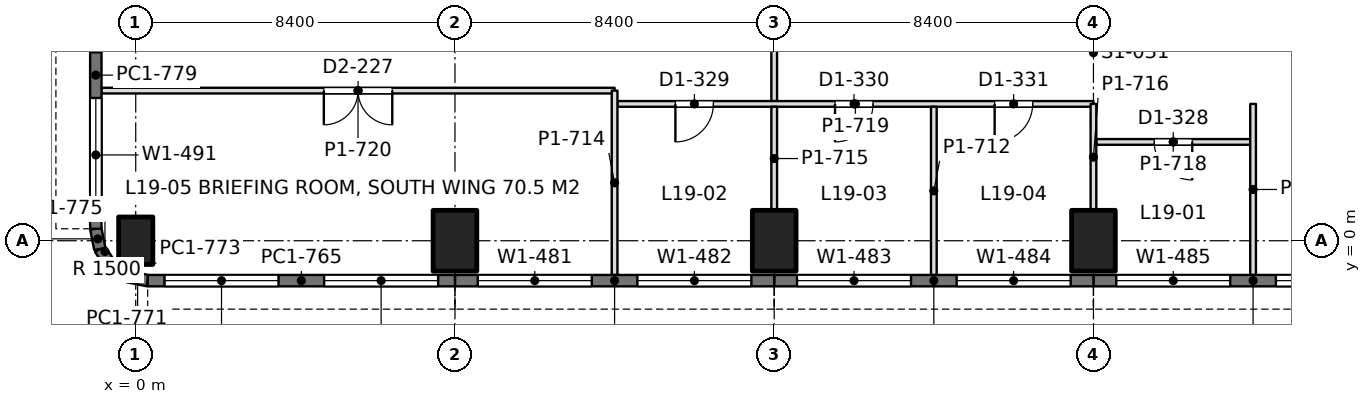
"""IFC4 building model, lengths in metres.
Left out: names, types, materials, properties, quantities, classifications, styles, units other than length and angle.
Written with IfcOpenShell. Run it as: python <this file> out.ifc"""

import sys

from ifc_helpers import new_model, si_unit, direction, frame, frame_2d, origin, origin_with_axes, origin_2d, place, context, subcontext, project, spatial, rectangle, extrude, element, fill, save


model = new_model("IFC4")
c1 = context("Model", 3, precision=1e-05, world=origin(), true_north=direction((0.0, 1.0)))
c2 = subcontext(c1, "Body", "Model", "MODEL_VIEW")
j1 = project(units=[si_unit("LENGTHUNIT", "METRE"), si_unit("PLANEANGLEUNIT", "RADIAN")], contexts=[c1])
p1 = place(None, origin())
s1 = spatial("IfcSite", under=j1, at=p1, CompositionType="ELEMENT")
p2 = place(p1, origin())
s2 = spatial("IfcBuilding", under=s1, at=p2, CompositionType="ELEMENT")
p3 = place(p2, frame((0.0, 0.0, 86.4)))
s3 = spatial("IfcBuildingStorey", under=s2, at=p3, CompositionType="ELEMENT", Elevation=86.4)
p4 = place(p3, origin_with_axes())
e1 = element("IfcColumn", 1, at=p4, inside=s3, PredefinedType="COLUMN", context=c2, shape_type="SweptSolid", body=[
    extrude(rectangle(XDim=0.9, YDim=1.25, at=origin_2d()), origin(), (0.0, 0.0, 1.0), 4.5),
])
for number, where, z_axis, x_axis in (
    (2, (8.4, 0.0, 0.0), (0.0, 0.0, 1.0), (1.0, 0.0, 0.0)),
    (3, (16.8, 0.0, 0.0), (0.0, 0.0, 1.0), (1.0, 0.0, 0.0)),
    (4, (25.2, 0.0, 0.0), (0.0, 0.0, 1.0), (1.0, 0.0, 0.0)),
):
    element("IfcColumn", number, at=place(p3, frame(where, z_axis=z_axis, x_axis=x_axis)), inside=s3, PredefinedType="COLUMN", context=c2, shape_type="SweptSolid", body=[
        extrude(rectangle(XDim=1.15, YDim=1.6, at=origin_2d()), origin(), (0.0, 0.0, 1.0), 4.5),
    ])
p5 = place(p3, frame((33.6, -1.05, 0.0), z_axis=(0.0, 0.0, 1.0), x_axis=(-1.0, 0.0, 0.0)))
e5 = element("IfcWall", 5, at=p5, inside=s3, PredefinedType="SOLIDWALL", context=c2, shape_type="SweptSolid", body=[
    extrude(rectangle(XDim=8.4, YDim=0.3, at=frame_2d((4.2, 0.0))), origin(), (0.0, 0.0, 1.0), 4.3),
])
p6 = place(p5, frame((0.6, 0.0, 0.9)))
e6 = element("IfcOpeningElement", 6, at=p6, cuts=e5, PredefinedType="OPENING", context=c2, shape_type="SweptSolid", body=[
    extrude(rectangle(XDim=3.0, YDim=1.9, at=frame_2d((1.5, 0.95))), frame((0.0, 0.16, 0.0), z_axis=(0.0, -1.0, 0.0), x_axis=(1.0, 0.0, 0.0)), (0.0, 0.0, 1.0), 0.32),
])
p7 = place(p5, frame((4.8, 0.0, 0.9)))
e7 = element("IfcOpeningElement", 7, at=p7, cuts=e5, PredefinedType="OPENING", context=c2, shape_type="SweptSolid", body=[
    extrude(rectangle(XDim=3.0, YDim=1.9, at=frame_2d((1.5, 0.95))), frame((0.0, 0.16, 0.0), z_axis=(0.0, -1.0, 0.0), x_axis=(1.0, 0.0, 0.0)), (0.0, 0.0, 1.0), 0.32),
])
p8 = place(p3, frame((25.2, -1.05, 0.0), z_axis=(0.0, 0.0, 1.0), x_axis=(-1.0, 0.0, 0.0)))
e8 = element("IfcWall", 8, at=p8, inside=s3, PredefinedType="SOLIDWALL", context=c2, shape_type="SweptSolid", body=[
    extrude(rectangle(XDim=8.4, YDim=0.3, at=frame_2d((4.2, 0.0))), origin(), (0.0, 0.0, 1.0), 4.3),
])
p9 = place(p8, frame((0.6, 0.0, 0.9)))
e9 = element("IfcOpeningElement", 9, at=p9, cuts=e8, PredefinedType="OPENING", context=c2, shape_type="SweptSolid", body=[
    extrude(rectangle(XDim=3.0, YDim=1.9, at=frame_2d((1.5, 0.95))), frame((0.0, 0.16, 0.0), z_axis=(0.0, -1.0, 0.0), x_axis=(1.0, 0.0, 0.0)), (0.0, 0.0, 1.0), 0.32),
])
p10 = place(p8, frame((4.8, 0.0, 0.9)))
e10 = element("IfcOpeningElement", 10, at=p10, cuts=e8, PredefinedType="OPENING", context=c2, shape_type="SweptSolid", body=[
    extrude(rectangle(XDim=3.0, YDim=1.9, at=frame_2d((1.5, 0.95))), frame((0.0, 0.16, 0.0), z_axis=(0.0, -1.0, 0.0), x_axis=(1.0, 0.0, 0.0)), (0.0, 0.0, 1.0), 0.32),
])
p11 = place(p3, frame((16.8, -1.05, 0.0), z_axis=(0.0, 0.0, 1.0), x_axis=(-1.0, 0.0, 0.0)))
e11 = element("IfcWall", 11, at=p11, inside=s3, PredefinedType="SOLIDWALL", context=c2, shape_type="SweptSolid", body=[
    extrude(rectangle(XDim=8.4, YDim=0.3, at=frame_2d((4.2, 0.0))), origin(), (0.0, 0.0, 1.0), 4.3),
])
p12 = place(p11, frame((0.6, 0.0, 0.9)))
e12 = element("IfcOpeningElement", 12, at=p12, cuts=e11, PredefinedType="OPENING", context=c2, shape_type="SweptSolid", body=[
    extrude(rectangle(XDim=3.0, YDim=1.9, at=frame_2d((1.5, 0.95))), frame((0.0, 0.16, 0.0), z_axis=(0.0, -1.0, 0.0), x_axis=(1.0, 0.0, 0.0)), (0.0, 0.0, 1.0), 0.32),
])
p13 = place(p11, frame((4.8, 0.0, 0.9)))
e13 = element("IfcOpeningElement", 13, at=p13, cuts=e11, PredefinedType="OPENING", context=c2, shape_type="SweptSolid", body=[
    extrude(rectangle(XDim=3.0, YDim=1.9, at=frame_2d((1.5, 0.95))), frame((0.0, 0.16, 0.0), z_axis=(0.0, -1.0, 0.0), x_axis=(1.0, 0.0, 0.0)), (0.0, 0.0, 1.0), 0.32),
])
p14 = place(p3, frame((8.4, -1.05, 0.0), z_axis=(0.0, 0.0, 1.0), x_axis=(-1.0, 0.0, 0.0)))
e14 = element("IfcWall", 14, at=p14, inside=s3, PredefinedType="SOLIDWALL", context=c2, shape_type="SweptSolid", body=[
    extrude(rectangle(XDim=8.085, YDim=0.3, at=frame_2d((4.042, 0.0))), origin(), (0.0, 0.0, 1.0), 4.3),
])
p15 = place(p14, frame((0.443, 0.0, 0.9)))
e15 = element("IfcOpeningElement", 15, at=p15, cuts=e14, PredefinedType="OPENING", context=c2, shape_type="SweptSolid", body=[
    extrude(rectangle(XDim=3.0, YDim=1.9, at=frame_2d((1.5, 0.95))), frame((0.0, 0.16, 0.0), z_axis=(0.0, -1.0, 0.0), x_axis=(1.0, 0.0, 0.0)), (0.0, 0.0, 1.0), 0.32),
])
p16 = place(p14, frame((4.643, 0.0, 0.9)))
e16 = element("IfcOpeningElement", 16, at=p16, cuts=e14, PredefinedType="OPENING", context=c2, shape_type="SweptSolid", body=[
    extrude(rectangle(XDim=3.0, YDim=1.9, at=frame_2d((1.5, 0.95))), frame((0.0, 0.16, 0.0), z_axis=(0.0, -1.0, 0.0), x_axis=(1.0, 0.0, 0.0)), (0.0, 0.0, 1.0), 0.32),
])
p17 = place(p3, frame((0.315, -1.05, 0.0), z_axis=(0.0, 0.0, 1.0), x_axis=(-0.980788534345, 0.195073962632, 0.0)))
e17 = element("IfcWall", 17, at=p17, inside=s3, PredefinedType="SOLIDWALL", context=c2, shape_type="SweptSolid", body=[
    extrude(rectangle(XDim=0.541, YDim=0.3, at=frame_2d((0.271, 0.0))), origin(), (0.0, 0.0, 1.0), 4.3),
])
for number, where, z_axis, x_axis in (
    (18, (-0.216, -0.945, 0.0), (0.0, 0.0, 1.0), (-0.831, 0.556, 0.0)),
    (19, (-0.653, -0.653, 0.0), (0.0, 0.0, 1.0), (-0.556, 0.831, 0.0)),
):
    element("IfcWall", number, at=place(p3, frame(where, z_axis=z_axis, x_axis=x_axis)), inside=s3, PredefinedType="SOLIDWALL", context=c2, shape_type="SweptSolid", body=[
        extrude(rectangle(XDim=0.526, YDim=0.3, at=frame_2d((0.263, 0.0))), origin(), (0.0, 0.0, 1.0), 4.3),
    ])
p18 = place(p3, frame((-0.945, -0.216, 0.0), z_axis=(0.0, 0.0, 1.0), x_axis=(-0.195073962632, 0.980788534345, 0.0)))
e20 = element("IfcWall", 20, at=p18, inside=s3, PredefinedType="SOLIDWALL", context=c2, shape_type="SweptSolid", body=[
    extrude(rectangle(XDim=0.541, YDim=0.3, at=frame_2d((0.271, 0.0))), origin(), (0.0, 0.0, 1.0), 4.3),
])
p19 = place(p3, frame((-1.05, 0.315, 0.0), z_axis=(0.0, 0.0, 1.0), x_axis=(0.0, 1.0, 0.0)))
e21 = element("IfcWall", 21, at=p19, inside=s3, PredefinedType="SOLIDWALL", context=c2, shape_type="SweptSolid", body=[
    extrude(rectangle(XDim=8.085, YDim=0.3, at=frame_2d((4.042, 0.0))), origin(), (0.0, 0.0, 1.0), 4.3),
])
p20 = place(p19, frame((0.443, 0.0, 0.9)))
e22 = element("IfcOpeningElement", 22, at=p20, cuts=e21, PredefinedType="OPENING", context=c2, shape_type="SweptSolid", body=[
    extrude(rectangle(XDim=3.0, YDim=1.9, at=frame_2d((1.5, 0.95))), frame((0.0, 0.16, 0.0), z_axis=(0.0, -1.0, 0.0), x_axis=(1.0, 0.0, 0.0)), (0.0, 0.0, 1.0), 0.32),
])
p21 = place(p19, frame((4.643, 0.0, 0.9)))
e23 = element("IfcOpeningElement", 23, at=p21, cuts=e21, PredefinedType="OPENING", context=c2, shape_type="SweptSolid", body=[
    extrude(rectangle(XDim=3.0, YDim=1.9, at=frame_2d((1.5, 0.95))), frame((0.0, 0.16, 0.0), z_axis=(0.0, -1.0, 0.0), x_axis=(1.0, 0.0, 0.0)), (0.0, 0.0, 1.0), 0.32),
])
p22 = place(p3, frame((-0.902, 3.95, 0.0), z_axis=(0.0, 0.0, 1.0), x_axis=(1.0, 0.0, 0.0)))
e24 = element("IfcWall", 24, at=p22, inside=s3, PredefinedType="PARTITIONING", context=c2, shape_type="SweptSolid", body=[
    extrude(rectangle(XDim=13.502, YDim=0.15, at=frame_2d((6.751, 0.0))), origin(), (0.0, 0.0, 1.0), 3.6),
])
p23 = place(p22, frame((5.852, 0.0, 0.0)))
e25 = element("IfcOpeningElement", 25, at=p23, cuts=e24, PredefinedType="OPENING", context=c2, shape_type="SweptSolid", body=[
    extrude(rectangle(XDim=1.8, YDim=2.2, at=frame_2d((0.9, 1.1))), frame((0.0, 0.085, 0.0), z_axis=(0.0, -1.0, 0.0), x_axis=(1.0, 0.0, 0.0)), (0.0, 0.0, 1.0), 0.17),
])
p24 = place(p3, frame((25.274, 2.6, 0.0), z_axis=(0.0, 0.0, 1.0), x_axis=(1.0, 0.0, 0.0)))
e26 = element("IfcWall", 26, at=p24, inside=s3, PredefinedType="PARTITIONING", context=c2, shape_type="SweptSolid", body=[
    extrude(rectangle(XDim=4.052, YDim=0.15, at=frame_2d((2.026, 0.0))), origin(), (0.0, 0.0, 1.0), 3.6),
])
p25 = place(p24, frame((1.526, 0.0, 0.0)))
e27 = element("IfcOpeningElement", 27, at=p25, cuts=e26, PredefinedType="OPENING", context=c2, shape_type="SweptSolid", body=[
    extrude(rectangle(XDim=1.0, YDim=2.2, at=frame_2d((0.5, 1.1))), frame((0.0, 0.085, 0.0), z_axis=(0.0, -1.0, 0.0), x_axis=(1.0, 0.0, 0.0)), (0.0, 0.0, 1.0), 0.17),
])
p26 = place(p3, frame((12.674, 3.6, 0.0), z_axis=(0.0, 0.0, 1.0), x_axis=(1.0, 0.0, 0.0)))
e28 = element("IfcWall", 28, at=p26, inside=s3, PredefinedType="PARTITIONING", context=c2, shape_type="SweptSolid", body=[
    extrude(rectangle(XDim=12.526, YDim=0.15, at=frame_2d((6.263, 0.0))), origin(), (0.0, 0.0, 1.0), 3.6),
])
p27 = place(p26, frame((1.526, 0.0, 0.0)))
e29 = element("IfcOpeningElement", 29, at=p27, cuts=e28, PredefinedType="OPENING", context=c2, shape_type="SweptSolid", body=[
    extrude(rectangle(XDim=1.0, YDim=2.2, at=frame_2d((0.5, 1.1))), frame((0.0, 0.085, 0.0), z_axis=(0.0, -1.0, 0.0), x_axis=(1.0, 0.0, 0.0)), (0.0, 0.0, 1.0), 0.17),
])
p28 = place(p26, frame((5.726, 0.0, 0.0)))
e30 = element("IfcOpeningElement", 30, at=p28, cuts=e28, PredefinedType="OPENING", context=c2, shape_type="SweptSolid", body=[
    extrude(rectangle(XDim=1.0, YDim=2.2, at=frame_2d((0.5, 1.1))), frame((0.0, 0.085, 0.0), z_axis=(0.0, -1.0, 0.0), x_axis=(1.0, 0.0, 0.0)), (0.0, 0.0, 1.0), 0.17),
])
p29 = place(p26, frame((9.926, 0.0, 0.0)))
e31 = element("IfcOpeningElement", 31, at=p29, cuts=e28, PredefinedType="OPENING", context=c2, shape_type="SweptSolid", body=[
    extrude(rectangle(XDim=1.0, YDim=2.2, at=frame_2d((0.5, 1.1))), frame((0.0, 0.085, 0.0), z_axis=(0.0, -1.0, 0.0), x_axis=(1.0, 0.0, 0.0)), (0.0, 0.0, 1.0), 0.17),
])
p30 = place(p3, frame((12.6, -0.902, 0.0), z_axis=(0.0, 0.0, 1.0), x_axis=(0.0, 1.0, 0.0)))
e32 = element("IfcWall", 32, at=p30, inside=s3, PredefinedType="PARTITIONING", context=c2, shape_type="SweptSolid", body=[
    extrude(rectangle(XDim=4.852, YDim=0.15, at=frame_2d((2.426, 0.0))), origin(), (0.0, 0.0, 1.0), 3.854),
])
p31 = place(p3, frame((16.8, 0.799, 0.0), z_axis=(0.0, 0.0, 1.0), x_axis=(0.0, 1.0, 0.0)))
e33 = element("IfcWall", 33, at=p31, inside=s3, PredefinedType="PARTITIONING", context=c2, shape_type="SweptSolid", body=[
    extrude(rectangle(XDim=2.727, YDim=0.15, at=frame_2d((1.363, 0.0))), origin(), (0.0, 0.0, 1.0), 3.6),
])
p32 = place(p3, frame((21.0, -0.902, 0.0), z_axis=(0.0, 0.0, 1.0), x_axis=(0.0, 1.0, 0.0)))
e34 = element("IfcWall", 34, at=p32, inside=s3, PredefinedType="PARTITIONING", context=c2, shape_type="SweptSolid", body=[
    extrude(rectangle(XDim=4.428, YDim=0.15, at=frame_2d((2.214, 0.0))), origin(), (0.0, 0.0, 1.0), 3.854),
])
p33 = place(p3, frame((25.2, 0.799, 0.0), z_axis=(0.0, 0.0, 1.0), x_axis=(0.0, 1.0, 0.0)))
e35 = element("IfcWall", 35, at=p33, inside=s3, PredefinedType="PARTITIONING", context=c2, shape_type="SweptSolid", body=[
    extrude(rectangle(XDim=2.801, YDim=0.15, at=frame_2d((1.4, 0.0))), origin(), (0.0, 0.0, 1.0), 3.6),
])
p34 = place(p3, frame((29.4, -0.902, 0.0), z_axis=(0.0, 0.0, 1.0), x_axis=(0.0, 1.0, 0.0)))
e36 = element("IfcWall", 36, at=p34, inside=s3, PredefinedType="PARTITIONING", context=c2, shape_type="SweptSolid", body=[
    extrude(rectangle(XDim=4.502, YDim=0.15, at=frame_2d((2.251, 0.0))), origin(), (0.0, 0.0, 1.0), 3.854),
])
p35 = place(p3, frame((16.8, 3.674, 0.0), z_axis=(0.0, 0.0, 1.0), x_axis=(0.0, 1.0, 0.0)))
e37 = element("IfcWall", 37, at=p35, inside=s3, PredefinedType="PARTITIONING", context=c2, shape_type="SweptSolid", body=[
    extrude(rectangle(XDim=3.827, YDim=0.15, at=frame_2d((1.914, 0.0))), origin(), (0.0, 0.0, 1.0), 3.6),
])
p36 = place(p6, origin())
e38 = element("IfcWindow", 38, at=p36, inside=s3, PartitioningType="SINGLE_PANEL", PredefinedType="WINDOW", context=c2, shape_type="SweptSolid", body=[
    extrude(rectangle(XDim=3.0, YDim=1.9, at=frame_2d((1.5, 0.95))), frame((0.0, 0.03, 0.0), z_axis=(0.0, -1.0, 0.0), x_axis=(1.0, 0.0, 0.0)), (0.0, 0.0, 1.0), 0.06),
])
fill(e6, e38)
p37 = place(p7, origin())
e39 = element("IfcWindow", 39, at=p37, inside=s3, PartitioningType="SINGLE_PANEL", PredefinedType="WINDOW", context=c2, shape_type="SweptSolid", body=[
    extrude(rectangle(XDim=3.0, YDim=1.9, at=frame_2d((1.5, 0.95))), frame((0.0, 0.03, 0.0), z_axis=(0.0, -1.0, 0.0), x_axis=(1.0, 0.0, 0.0)), (0.0, 0.0, 1.0), 0.06),
])
fill(e7, e39)
p38 = place(p9, origin())
e40 = element("IfcWindow", 40, at=p38, inside=s3, PartitioningType="SINGLE_PANEL", PredefinedType="WINDOW", context=c2, shape_type="SweptSolid", body=[
    extrude(rectangle(XDim=3.0, YDim=1.9, at=frame_2d((1.5, 0.95))), frame((0.0, 0.03, 0.0), z_axis=(0.0, -1.0, 0.0), x_axis=(1.0, 0.0, 0.0)), (0.0, 0.0, 1.0), 0.06),
])
fill(e9, e40)
p39 = place(p10, origin())
e41 = element("IfcWindow", 41, at=p39, inside=s3, PartitioningType="SINGLE_PANEL", PredefinedType="WINDOW", context=c2, shape_type="SweptSolid", body=[
    extrude(rectangle(XDim=3.0, YDim=1.9, at=frame_2d((1.5, 0.95))), frame((0.0, 0.03, 0.0), z_axis=(0.0, -1.0, 0.0), x_axis=(1.0, 0.0, 0.0)), (0.0, 0.0, 1.0), 0.06),
])
fill(e10, e41)
p40 = place(p12, origin())
e42 = element("IfcWindow", 42, at=p40, inside=s3, PartitioningType="SINGLE_PANEL", PredefinedType="WINDOW", context=c2, shape_type="SweptSolid", body=[
    extrude(rectangle(XDim=3.0, YDim=1.9, at=frame_2d((1.5, 0.95))), frame((0.0, 0.03, 0.0), z_axis=(0.0, -1.0, 0.0), x_axis=(1.0, 0.0, 0.0)), (0.0, 0.0, 1.0), 0.06),
])
fill(e12, e42)
p41 = place(p13, origin())
e43 = element("IfcWindow", 43, at=p41, inside=s3, PartitioningType="SINGLE_PANEL", PredefinedType="WINDOW", context=c2, shape_type="SweptSolid", body=[
    extrude(rectangle(XDim=3.0, YDim=1.9, at=frame_2d((1.5, 0.95))), frame((0.0, 0.03, 0.0), z_axis=(0.0, -1.0, 0.0), x_axis=(1.0, 0.0, 0.0)), (0.0, 0.0, 1.0), 0.06),
])
fill(e13, e43)
p42 = place(p15, origin())
e44 = element("IfcWindow", 44, at=p42, inside=s3, PartitioningType="SINGLE_PANEL", PredefinedType="WINDOW", context=c2, shape_type="SweptSolid", body=[
    extrude(rectangle(XDim=3.0, YDim=1.9, at=frame_2d((1.5, 0.95))), frame((0.0, 0.03, 0.0), z_axis=(0.0, -1.0, 0.0), x_axis=(1.0, 0.0, 0.0)), (0.0, 0.0, 1.0), 0.06),
])
fill(e15, e44)
p43 = place(p16, origin())
e45 = element("IfcWindow", 45, at=p43, inside=s3, PartitioningType="SINGLE_PANEL", PredefinedType="WINDOW", context=c2, shape_type="SweptSolid", body=[
    extrude(rectangle(XDim=3.0, YDim=1.9, at=frame_2d((1.5, 0.95))), frame((0.0, 0.03, 0.0), z_axis=(0.0, -1.0, 0.0), x_axis=(1.0, 0.0, 0.0)), (0.0, 0.0, 1.0), 0.06),
])
fill(e16, e45)
p44 = place(p20, origin())
e46 = element("IfcWindow", 46, at=p44, inside=s3, PartitioningType="SINGLE_PANEL", PredefinedType="WINDOW", context=c2, shape_type="SweptSolid", body=[
    extrude(rectangle(XDim=3.0, YDim=1.9, at=frame_2d((1.5, 0.95))), frame((0.0, 0.03, 0.0), z_axis=(0.0, -1.0, 0.0), x_axis=(1.0, 0.0, 0.0)), (0.0, 0.0, 1.0), 0.06),
])
fill(e22, e46)
p45 = place(p23, frame((1.8, 0.0, 0.0), z_axis=(0.0, 0.0, 1.0), x_axis=(-1.0, 0.0, 0.0)))
e47 = element("IfcDoor", 47, at=p45, inside=s3, OperationType="DOUBLE_DOOR_SINGLE_SWING", PredefinedType="DOOR", context=c2, shape_type="SweptSolid", body=[
    extrude(rectangle(XDim=1.8, YDim=2.2, at=frame_2d((0.9, 1.1))), frame((0.0, 0.025, 0.0), z_axis=(0.0, -1.0, 0.0), x_axis=(1.0, 0.0, 0.0)), (0.0, 0.0, 1.0), 0.05),
])
fill(e25, e47)
p46 = place(p25, frame((1.0, 0.0, 0.0), z_axis=(0.0, 0.0, 1.0), x_axis=(-1.0, 0.0, 0.0)))
e48 = element("IfcDoor", 48, at=p46, inside=s3, OperationType="SINGLE_SWING_LEFT", PredefinedType="DOOR", context=c2, shape_type="SweptSolid", body=[
    extrude(rectangle(XDim=1.0, YDim=2.2, at=frame_2d((0.5, 1.1))), frame((0.0, 0.025, 0.0), z_axis=(0.0, -1.0, 0.0), x_axis=(1.0, 0.0, 0.0)), (0.0, 0.0, 1.0), 0.05),
])
fill(e27, e48)
p47 = place(p27, frame((1.0, 0.0, 0.0), z_axis=(0.0, 0.0, 1.0), x_axis=(-1.0, 0.0, 0.0)))
e49 = element("IfcDoor", 49, at=p47, inside=s3, OperationType="SINGLE_SWING_RIGHT", PredefinedType="DOOR", context=c2, shape_type="SweptSolid", body=[
    extrude(rectangle(XDim=1.0, YDim=2.2, at=frame_2d((0.5, 1.1))), frame((0.0, 0.025, 0.0), z_axis=(0.0, -1.0, 0.0), x_axis=(1.0, 0.0, 0.0)), (0.0, 0.0, 1.0), 0.05),
])
fill(e29, e49)
p48 = place(p28, frame((1.0, 0.0, 0.0), z_axis=(0.0, 0.0, 1.0), x_axis=(-1.0, 0.0, 0.0)))
e50 = element("IfcDoor", 50, at=p48, inside=s3, OperationType="SINGLE_SWING_RIGHT", PredefinedType="DOOR", context=c2, shape_type="SweptSolid", body=[
    extrude(rectangle(XDim=1.0, YDim=2.2, at=frame_2d((0.5, 1.1))), frame((0.0, 0.025, 0.0), z_axis=(0.0, -1.0, 0.0), x_axis=(1.0, 0.0, 0.0)), (0.0, 0.0, 1.0), 0.05),
])
fill(e30, e50)
p49 = place(p29, frame((1.0, 0.0, 0.0), z_axis=(0.0, 0.0, 1.0), x_axis=(-1.0, 0.0, 0.0)))
e51 = element("IfcDoor", 51, at=p49, inside=s3, OperationType="SINGLE_SWING_RIGHT", PredefinedType="DOOR", context=c2, shape_type="SweptSolid", body=[
    extrude(rectangle(XDim=1.0, YDim=2.2, at=frame_2d((0.5, 1.1))), frame((0.0, 0.025, 0.0), z_axis=(0.0, -1.0, 0.0), x_axis=(1.0, 0.0, 0.0)), (0.0, 0.0, 1.0), 0.05),
])
fill(e31, e51)
save(model, sys.argv[1])
